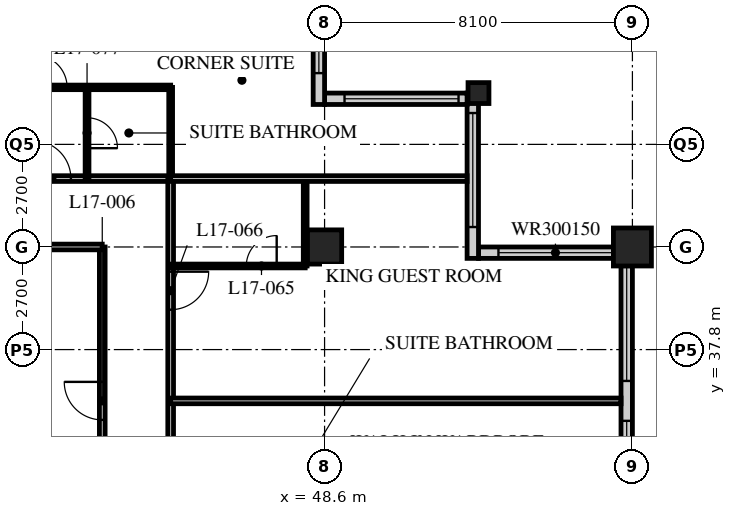
"""IFC4 building model, lengths in metres.
Left out: names, types, materials, properties, quantities, classifications, styles, units other than length and angle.
Written with IfcOpenShell. Run it as: python <this file> out.ifc"""

import sys

from ifc_helpers import new_model, si_unit, direction, frame, frame_2d, origin, origin_2d, place, context, subcontext, project, spatial, rectangle, hollow_rectangle, extrude, element, fill, save


model = new_model("IFC4")
c1 = context("Model", 3, precision=1e-05, world=origin(), true_north=direction((0.0, 1.0)))
c2 = subcontext(c1, "Body", "Model", "MODEL_VIEW")
j1 = project(units=[si_unit("LENGTHUNIT", "METRE"), si_unit("PLANEANGLEUNIT", "RADIAN")], contexts=[c1])
p1 = place(None, origin())
s1 = spatial("IfcSite", under=j1, at=p1, CompositionType="ELEMENT")
p2 = place(p1, origin())
s2 = spatial("IfcBuilding", under=s1, at=p2, CompositionType="ELEMENT")
p3 = place(p2, frame((0.0, 0.0, 70.4)))
s3 = spatial("IfcBuildingStorey", under=s2, at=p3, CompositionType="ELEMENT", Elevation=70.4)
p4 = place(p3, frame((48.6, 40.5, 0.0), z_axis=(0.0, 0.0, 1.0), x_axis=(1.0, 0.0, 0.0)))
e1 = element("IfcColumn", 1, at=p4, inside=s3, PredefinedType="COLUMN", context=c2, shape_type="SweptSolid", body=[
    extrude(hollow_rectangle(XDim=0.9, YDim=0.9, WallThickness=0.09, at=origin_2d()), origin(), (0.0, 0.0, 1.0), 3.4),
])
p5 = place(p3, frame((52.65, 44.55, 0.0), z_axis=(0.0, 0.0, 1.0), x_axis=(1.0, 0.0, 0.0)))
e2 = element("IfcColumn", 2, at=p5, inside=s3, PredefinedType="COLUMN", context=c2, shape_type="SweptSolid", body=[
    extrude(hollow_rectangle(XDim=0.55, YDim=0.55, WallThickness=0.05, at=origin_2d()), origin(), (0.0, 0.0, 1.0), 3.4),
])
p6 = place(p3, frame((56.7, 40.5, 0.0), z_axis=(0.0, 0.0, 1.0), x_axis=(1.0, 0.0, 0.0)))
e3 = element("IfcColumn", 3, at=p6, inside=s3, PredefinedType="COLUMN", context=c2, shape_type="SweptSolid", body=[
    extrude(hollow_rectangle(XDim=1.0, YDim=1.0, WallThickness=0.1, at=origin_2d()), origin(), (0.0, 0.0, 1.0), 3.4),
])
p7 = place(p3, frame((56.55, 8.4, 0.0), z_axis=(0.0, 0.0, 1.0), x_axis=(0.0, 1.0, 0.0)))
e4 = element("IfcWall", 4, at=p7, inside=s3, PredefinedType="SOLIDWALL", context=c2, shape_type="SweptSolid", body=[
    extrude(rectangle(XDim=32.1, YDim=0.3, at=frame_2d((16.05, 0.0))), origin(), (0.0, 0.0, 1.0), 3.19),
])
p8 = place(p7, frame((0.225, 0.0, 0.9)))
e5 = element("IfcOpeningElement", 5, at=p8, cuts=e4, PredefinedType="OPENING", context=c2, shape_type="SweptSolid", body=[
    extrude(rectangle(XDim=3.0, YDim=2.0, at=frame_2d((1.5, 1.0))), frame((0.0, 0.16, 0.0), z_axis=(0.0, -1.0, 0.0), x_axis=(1.0, 0.0, 0.0)), (0.0, 0.0, 1.0), 0.32),
])
p9 = place(p7, frame((4.275, 0.0, 0.9)))
e6 = element("IfcOpeningElement", 6, at=p9, cuts=e4, PredefinedType="OPENING", context=c2, shape_type="SweptSolid", body=[
    extrude(rectangle(XDim=3.0, YDim=2.0, at=frame_2d((1.5, 1.0))), frame((0.0, 0.16, 0.0), z_axis=(0.0, -1.0, 0.0), x_axis=(1.0, 0.0, 0.0)), (0.0, 0.0, 1.0), 0.32),
])
p10 = place(p7, frame((8.325, 0.0, 0.9)))
e7 = element("IfcOpeningElement", 7, at=p10, cuts=e4, PredefinedType="OPENING", context=c2, shape_type="SweptSolid", body=[
    extrude(rectangle(XDim=3.0, YDim=2.0, at=frame_2d((1.5, 1.0))), frame((0.0, 0.16, 0.0), z_axis=(0.0, -1.0, 0.0), x_axis=(1.0, 0.0, 0.0)), (0.0, 0.0, 1.0), 0.32),
])
p11 = place(p7, frame((12.375, 0.0, 0.9)))
e8 = element("IfcOpeningElement", 8, at=p11, cuts=e4, PredefinedType="OPENING", context=c2, shape_type="SweptSolid", body=[
    extrude(rectangle(XDim=3.0, YDim=2.0, at=frame_2d((1.5, 1.0))), frame((0.0, 0.16, 0.0), z_axis=(0.0, -1.0, 0.0), x_axis=(1.0, 0.0, 0.0)), (0.0, 0.0, 1.0), 0.32),
])
p12 = place(p7, frame((16.425, 0.0, 0.9)))
e9 = element("IfcOpeningElement", 9, at=p12, cuts=e4, PredefinedType="OPENING", context=c2, shape_type="SweptSolid", body=[
    extrude(rectangle(XDim=3.0, YDim=2.0, at=frame_2d((1.5, 1.0))), frame((0.0, 0.16, 0.0), z_axis=(0.0, -1.0, 0.0), x_axis=(1.0, 0.0, 0.0)), (0.0, 0.0, 1.0), 0.32),
])
p13 = place(p7, frame((20.475, 0.0, 0.9)))
e10 = element("IfcOpeningElement", 10, at=p13, cuts=e4, PredefinedType="OPENING", context=c2, shape_type="SweptSolid", body=[
    extrude(rectangle(XDim=3.0, YDim=2.0, at=frame_2d((1.5, 1.0))), frame((0.0, 0.16, 0.0), z_axis=(0.0, -1.0, 0.0), x_axis=(1.0, 0.0, 0.0)), (0.0, 0.0, 1.0), 0.32),
])
p14 = place(p7, frame((24.525, 0.0, 0.9)))
e11 = element("IfcOpeningElement", 11, at=p14, cuts=e4, PredefinedType="OPENING", context=c2, shape_type="SweptSolid", body=[
    extrude(rectangle(XDim=3.0, YDim=2.0, at=frame_2d((1.5, 1.0))), frame((0.0, 0.16, 0.0), z_axis=(0.0, -1.0, 0.0), x_axis=(1.0, 0.0, 0.0)), (0.0, 0.0, 1.0), 0.32),
])
p15 = place(p7, frame((28.575, 0.0, 0.9)))
e12 = element("IfcOpeningElement", 12, at=p15, cuts=e4, PredefinedType="OPENING", context=c2, shape_type="SweptSolid", body=[
    extrude(rectangle(XDim=3.0, YDim=2.0, at=frame_2d((1.5, 1.0))), frame((0.0, 0.16, 0.0), z_axis=(0.0, -1.0, 0.0), x_axis=(1.0, 0.0, 0.0)), (0.0, 0.0, 1.0), 0.32),
])
p16 = place(p3, frame((56.4, 40.35, 0.0), z_axis=(0.0, 0.0, 1.0), x_axis=(-1.0, 0.0, 0.0)))
e13 = element("IfcWall", 13, at=p16, inside=s3, PredefinedType="SOLIDWALL", context=c2, shape_type="SweptSolid", body=[
    extrude(rectangle(XDim=3.75, YDim=0.3, at=frame_2d((1.875, 0.0))), origin(), (0.0, 0.0, 1.0), 3.19),
])
p17 = place(p16, frame((0.225, 0.0, 0.9)))
e14 = element("IfcOpeningElement", 14, at=p17, cuts=e13, PredefinedType="OPENING", context=c2, shape_type="SweptSolid", body=[
    extrude(rectangle(XDim=3.0, YDim=1.5, at=frame_2d((1.5, 0.75))), frame((0.0, 0.16, 0.0), z_axis=(0.0, -1.0, 0.0), x_axis=(1.0, 0.0, 0.0)), (0.0, 0.0, 1.0), 0.32),
])
p18 = place(p3, frame((52.5, 40.2, 0.0), z_axis=(0.0, 0.0, 1.0), x_axis=(0.0, 1.0, 0.0)))
e15 = element("IfcWall", 15, at=p18, inside=s3, PredefinedType="SOLIDWALL", context=c2, shape_type="SweptSolid", body=[
    extrude(rectangle(XDim=4.35, YDim=0.3, at=frame_2d((2.175, 0.0))), origin(), (0.0, 0.0, 1.0), 3.19),
])
p19 = place(p18, frame((0.825, 0.0, 0.9)))
e16 = element("IfcOpeningElement", 16, at=p19, cuts=e15, PredefinedType="OPENING", context=c2, shape_type="SweptSolid", body=[
    extrude(rectangle(XDim=3.0, YDim=1.5, at=frame_2d((1.5, 0.75))), frame((0.0, 0.16, 0.0), z_axis=(0.0, -1.0, 0.0), x_axis=(1.0, 0.0, 0.0)), (0.0, 0.0, 1.0), 0.32),
])
p20 = place(p3, frame((52.35, 44.4, 0.0), z_axis=(0.0, 0.0, 1.0), x_axis=(-1.0, 0.0, 0.0)))
e17 = element("IfcWall", 17, at=p20, inside=s3, PredefinedType="SOLIDWALL", context=c2, shape_type="SweptSolid", body=[
    extrude(rectangle(XDim=3.75, YDim=0.3, at=frame_2d((1.875, 0.0))), origin(), (0.0, 0.0, 1.0), 3.19),
])
p21 = place(p20, frame((0.225, 0.0, 0.9)))
e18 = element("IfcOpeningElement", 18, at=p21, cuts=e17, PredefinedType="OPENING", context=c2, shape_type="SweptSolid", body=[
    extrude(rectangle(XDim=3.0, YDim=1.5, at=frame_2d((1.5, 0.75))), frame((0.0, 0.16, 0.0), z_axis=(0.0, -1.0, 0.0), x_axis=(1.0, 0.0, 0.0)), (0.0, 0.0, 1.0), 0.32),
])
p22 = place(p3, frame((48.45, 44.25, 0.0), z_axis=(0.0, 0.0, 1.0), x_axis=(0.0, 1.0, 0.0)))
e19 = element("IfcWall", 19, at=p22, inside=s3, PredefinedType="SOLIDWALL", context=c2, shape_type="SweptSolid", body=[
    extrude(rectangle(XDim=4.35, YDim=0.3, at=frame_2d((2.175, 0.0))), origin(), (0.0, 0.0, 1.0), 3.19),
])
p23 = place(p22, frame((0.825, 0.0, 0.9)))
e20 = element("IfcOpeningElement", 20, at=p23, cuts=e19, PredefinedType="OPENING", context=c2, shape_type="SweptSolid", body=[
    extrude(rectangle(XDim=3.0, YDim=1.5, at=frame_2d((1.5, 0.75))), frame((0.0, 0.16, 0.0), z_axis=(0.0, -1.0, 0.0), x_axis=(1.0, 0.0, 0.0)), (0.0, 0.0, 1.0), 0.32),
])
p24 = place(p3, frame((8.1, 42.3, 0.0), z_axis=(0.0, 0.0, 1.0), x_axis=(1.0, 0.0, 0.0)))
e21 = element("IfcWall", 21, at=p24, inside=s3, PredefinedType="PARTITIONING", context=c2, shape_type="SweptSolid", body=[
    extrude(rectangle(XDim=36.45, YDim=0.15, at=frame_2d((18.225, 0.0))), origin(), (0.0, 0.0, 1.0), 3.19),
])
p25 = place(p24, frame((9.5, 0.0, 0.0)))
e22 = element("IfcOpeningElement", 22, at=p25, cuts=e21, PredefinedType="OPENING", context=c2, shape_type="SweptSolid", body=[
    extrude(rectangle(XDim=1.0, YDim=2.1, at=frame_2d((0.5, 1.05))), frame((0.0, 0.085, 0.0), z_axis=(0.0, -1.0, 0.0), x_axis=(1.0, 0.0, 0.0)), (0.0, 0.0, 1.0), 0.17),
])
p26 = place(p24, frame((14.6, 0.0, 0.0)))
e23 = element("IfcOpeningElement", 23, at=p26, cuts=e21, PredefinedType="OPENING", context=c2, shape_type="SweptSolid", body=[
    extrude(rectangle(XDim=1.0, YDim=2.1, at=frame_2d((0.5, 1.05))), frame((0.0, 0.085, 0.0), z_axis=(0.0, -1.0, 0.0), x_axis=(1.0, 0.0, 0.0)), (0.0, 0.0, 1.0), 0.17),
])
p27 = place(p24, frame((18.65, 0.0, 0.0)))
e24 = element("IfcOpeningElement", 24, at=p27, cuts=e21, PredefinedType="OPENING", context=c2, shape_type="SweptSolid", body=[
    extrude(rectangle(XDim=1.0, YDim=2.1, at=frame_2d((0.5, 1.05))), frame((0.0, 0.085, 0.0), z_axis=(0.0, -1.0, 0.0), x_axis=(1.0, 0.0, 0.0)), (0.0, 0.0, 1.0), 0.17),
])
p28 = place(p24, frame((25.7, 0.0, 0.0)))
e25 = element("IfcOpeningElement", 25, at=p28, cuts=e21, PredefinedType="OPENING", context=c2, shape_type="SweptSolid", body=[
    extrude(rectangle(XDim=1.0, YDim=2.1, at=frame_2d((0.5, 1.05))), frame((0.0, 0.085, 0.0), z_axis=(0.0, -1.0, 0.0), x_axis=(1.0, 0.0, 0.0)), (0.0, 0.0, 1.0), 0.17),
])
p29 = place(p24, frame((30.8, 0.0, 0.0)))
e26 = element("IfcOpeningElement", 26, at=p29, cuts=e21, PredefinedType="OPENING", context=c2, shape_type="SweptSolid", body=[
    extrude(rectangle(XDim=1.0, YDim=2.1, at=frame_2d((0.5, 1.05))), frame((0.0, 0.085, 0.0), z_axis=(0.0, -1.0, 0.0), x_axis=(1.0, 0.0, 0.0)), (0.0, 0.0, 1.0), 0.17),
])
p30 = place(p24, frame((32.825, 0.0, 0.0)))
e27 = element("IfcOpeningElement", 27, at=p30, cuts=e21, PredefinedType="OPENING", context=c2, shape_type="SweptSolid", body=[
    extrude(rectangle(XDim=1.0, YDim=2.1, at=frame_2d((0.5, 1.05))), frame((0.0, 0.085, 0.0), z_axis=(0.0, -1.0, 0.0), x_axis=(1.0, 0.0, 0.0)), (0.0, 0.0, 1.0), 0.17),
])
p31 = place(p24, frame((2.625, 0.0, 0.0)))
e28 = element("IfcOpeningElement", 28, at=p31, cuts=e21, PredefinedType="OPENING", context=c2, shape_type="SweptSolid", body=[
    extrude(rectangle(XDim=1.0, YDim=2.1, at=frame_2d((0.5, 1.05))), frame((0.0, 0.085, 0.0), z_axis=(0.0, -1.0, 0.0), x_axis=(1.0, 0.0, 0.0)), (0.0, 0.0, 1.0), 0.17),
])
p32 = place(p3, frame((44.55, 12.15, 0.0), z_axis=(0.0, 0.0, 1.0), x_axis=(0.0, 1.0, 0.0)))
e29 = element("IfcWall", 29, at=p32, inside=s3, PredefinedType="PARTITIONING", context=c2, shape_type="SweptSolid", body=[
    extrude(rectangle(XDim=30.15, YDim=0.15, at=frame_2d((15.075, 0.0))), origin(), (0.0, 0.0, 1.0), 3.19),
])
p33 = place(p32, frame((2.45, 0.0, 0.0)))
e30 = element("IfcOpeningElement", 30, at=p33, cuts=e29, PredefinedType="OPENING", context=c2, shape_type="SweptSolid", body=[
    extrude(rectangle(XDim=1.0, YDim=2.1, at=frame_2d((0.5, 1.05))), frame((0.0, 0.085, 0.0), z_axis=(0.0, -1.0, 0.0), x_axis=(1.0, 0.0, 0.0)), (0.0, 0.0, 1.0), 0.17),
])
p34 = place(p32, frame((4.35, 0.0, 0.0)))
e31 = element("IfcOpeningElement", 31, at=p34, cuts=e29, PredefinedType="OPENING", context=c2, shape_type="SweptSolid", body=[
    extrude(rectangle(XDim=1.0, YDim=2.1, at=frame_2d((0.5, 1.05))), frame((0.0, 0.085, 0.0), z_axis=(0.0, -1.0, 0.0), x_axis=(1.0, 0.0, 0.0)), (0.0, 0.0, 1.0), 0.17),
])
p35 = place(p32, frame((8.4, 0.0, 0.0)))
e32 = element("IfcOpeningElement", 32, at=p35, cuts=e29, PredefinedType="OPENING", context=c2, shape_type="SweptSolid", body=[
    extrude(rectangle(XDim=1.0, YDim=2.1, at=frame_2d((0.5, 1.05))), frame((0.0, 0.085, 0.0), z_axis=(0.0, -1.0, 0.0), x_axis=(1.0, 0.0, 0.0)), (0.0, 0.0, 1.0), 0.17),
])
p36 = place(p32, frame((14.6, 0.0, 0.0)))
e33 = element("IfcOpeningElement", 33, at=p36, cuts=e29, PredefinedType="OPENING", context=c2, shape_type="SweptSolid", body=[
    extrude(rectangle(XDim=1.0, YDim=2.1, at=frame_2d((0.5, 1.05))), frame((0.0, 0.085, 0.0), z_axis=(0.0, -1.0, 0.0), x_axis=(1.0, 0.0, 0.0)), (0.0, 0.0, 1.0), 0.17),
])
p37 = place(p32, frame((21.65, 0.0, 0.0)))
e34 = element("IfcOpeningElement", 34, at=p37, cuts=e29, PredefinedType="OPENING", context=c2, shape_type="SweptSolid", body=[
    extrude(rectangle(XDim=1.0, YDim=2.1, at=frame_2d((0.5, 1.05))), frame((0.0, 0.085, 0.0), z_axis=(0.0, -1.0, 0.0), x_axis=(1.0, 0.0, 0.0)), (0.0, 0.0, 1.0), 0.17),
])
p38 = place(p32, frame((26.7, 0.0, 0.0)))
e35 = element("IfcOpeningElement", 35, at=p38, cuts=e29, PredefinedType="OPENING", context=c2, shape_type="SweptSolid", body=[
    extrude(rectangle(XDim=1.0, YDim=2.1, at=frame_2d((0.5, 1.05))), frame((0.0, 0.085, 0.0), z_axis=(0.0, -1.0, 0.0), x_axis=(1.0, 0.0, 0.0)), (0.0, 0.0, 1.0), 0.17),
])
p39 = place(p3, frame((42.75, 13.95, 0.0), z_axis=(0.0, 0.0, 1.0), x_axis=(0.0, 1.0, 0.0)))
e36 = element("IfcWall", 36, at=p39, inside=s3, PredefinedType="PARTITIONING", context=c2, shape_type="SweptSolid", body=[
    extrude(rectangle(XDim=26.55, YDim=0.15, at=frame_2d((13.275, 0.0))), origin(), (0.0, 0.0, 1.0), 3.19),
])
p40 = place(p39, frame((13.9, 0.0, 0.0)))
e37 = element("IfcOpeningElement", 37, at=p40, cuts=e36, PredefinedType="OPENING", context=c2, shape_type="SweptSolid", body=[
    extrude(rectangle(XDim=1.0, YDim=2.1, at=frame_2d((0.5, 1.05))), frame((0.0, 0.085, 0.0), z_axis=(0.0, -1.0, 0.0), x_axis=(1.0, 0.0, 0.0)), (0.0, 0.0, 1.0), 0.17),
])
p41 = place(p39, frame((22.0, 0.0, 0.0)))
e38 = element("IfcOpeningElement", 38, at=p41, cuts=e36, PredefinedType="OPENING", context=c2, shape_type="SweptSolid", body=[
    extrude(rectangle(XDim=1.0, YDim=2.1, at=frame_2d((0.5, 1.05))), frame((0.0, 0.085, 0.0), z_axis=(0.0, -1.0, 0.0), x_axis=(1.0, 0.0, 0.0)), (0.0, 0.0, 1.0), 0.17),
])
p42 = place(p3, frame((42.75, 40.5, 0.0), z_axis=(0.0, 0.0, 1.0), x_axis=(-1.0, 0.0, 0.0)))
e39 = element("IfcWall", 39, at=p42, inside=s3, PredefinedType="PARTITIONING", context=c2, shape_type="SweptSolid", body=[
    extrude(rectangle(XDim=2.05, YDim=0.15, at=frame_2d((1.025, 0.0))), origin(), (0.0, 0.0, 1.0), 2.578),
])
p43 = place(p3, frame((44.55, 36.45, 0.0), z_axis=(0.0, 0.0, 1.0), x_axis=(1.0, 0.0, 0.0)))
e40 = element("IfcWall", 40, at=p43, inside=s3, PredefinedType="PARTITIONING", context=c2, shape_type="SweptSolid", body=[
    extrude(rectangle(XDim=11.85, YDim=0.15, at=frame_2d((5.925, 0.0))), origin(), (0.0, 0.0, 1.0), 3.19),
])
p44 = place(p3, frame((48.09, 40.0, 0.0), z_axis=(0.0, 0.0, 1.0), x_axis=(0.0, 1.0, 0.0)))
e41 = element("IfcWall", 41, at=p44, inside=s3, PredefinedType="PARTITIONING", context=c2, shape_type="SweptSolid", body=[
    extrude(rectangle(XDim=2.3, YDim=0.1, at=frame_2d((1.15, 0.0))), origin(), (0.0, 0.0, 1.0), 3.19),
])
p45 = place(p3, frame((44.55, 40.0, 0.0), z_axis=(0.0, 0.0, 1.0), x_axis=(1.0, 0.0, 0.0)))
e42 = element("IfcWall", 42, at=p45, inside=s3, PredefinedType="PARTITIONING", context=c2, shape_type="SweptSolid", body=[
    extrude(rectangle(XDim=3.54, YDim=0.1, at=frame_2d((1.77, 0.0))), origin(), (0.0, 0.0, 1.0), 3.19),
])
p46 = place(p45, frame((1.99, 0.0, 0.0)))
e43 = element("IfcOpeningElement", 43, at=p46, cuts=e42, PredefinedType="OPENING", context=c2, shape_type="SweptSolid", body=[
    extrude(rectangle(XDim=0.8, YDim=2.1, at=frame_2d((0.4, 1.05))), frame((0.0, 0.06, 0.0), z_axis=(0.0, -1.0, 0.0), x_axis=(1.0, 0.0, 0.0)), (0.0, 0.0, 1.0), 0.12),
])
p47 = place(p3, frame((40.5, 44.7, 0.0), z_axis=(0.0, 0.0, 1.0), x_axis=(1.0, 0.0, 0.0)))
e44 = element("IfcWall", 44, at=p47, inside=s3, PredefinedType="PARTITIONING", context=c2, shape_type="SweptSolid", body=[
    extrude(rectangle(XDim=4.05, YDim=0.12, at=frame_2d((2.025, 0.0))), origin(), (0.0, 0.0, 1.0), 3.19),
])
p48 = place(p47, frame((0.475, 0.0, 0.0)))
e45 = element("IfcOpeningElement", 45, at=p48, cuts=e44, PredefinedType="OPENING", context=c2, shape_type="SweptSolid", body=[
    extrude(rectangle(XDim=0.85, YDim=2.1, at=frame_2d((0.425, 1.05))), frame((0.0, 0.07, 0.0), z_axis=(0.0, -1.0, 0.0), x_axis=(1.0, 0.0, 0.0)), (0.0, 0.0, 1.0), 0.14),
])
p49 = place(p3, frame((42.35, 42.3, 0.0), z_axis=(0.0, 0.0, 1.0), x_axis=(0.0, 1.0, 0.0)))
e46 = element("IfcWall", 46, at=p49, inside=s3, PredefinedType="PARTITIONING", context=c2, shape_type="SweptSolid", body=[
    extrude(rectangle(XDim=2.4, YDim=0.1, at=frame_2d((1.2, 0.0))), origin(), (0.0, 0.0, 1.0), 3.19),
])
p50 = place(p49, frame((0.8, 0.0, 0.0)))
e47 = element("IfcOpeningElement", 47, at=p50, cuts=e46, PredefinedType="OPENING", context=c2, shape_type="SweptSolid", body=[
    extrude(rectangle(XDim=0.8, YDim=2.1, at=frame_2d((0.4, 1.05))), frame((0.0, 0.06, 0.0), z_axis=(0.0, -1.0, 0.0), x_axis=(1.0, 0.0, 0.0)), (0.0, 0.0, 1.0), 0.12),
])
p51 = place(p3, frame((44.55, 42.3, 0.0), z_axis=(0.0, 0.0, 1.0), x_axis=(0.0, 1.0, 0.0)))
e48 = element("IfcWall", 48, at=p51, inside=s3, PredefinedType="PARTITIONING", context=c2, shape_type="SweptSolid", body=[
    extrude(rectangle(XDim=2.4, YDim=0.1, at=frame_2d((1.2, 0.0))), origin(), (0.0, 0.0, 1.0), 3.19),
])
p52 = place(p3, frame((44.55, 42.3, 0.0), z_axis=(0.0, 0.0, 1.0), x_axis=(1.0, 0.0, 0.0)))
e49 = element("IfcWall", 49, at=p52, inside=s3, PredefinedType="PARTITIONING", context=c2, shape_type="SweptSolid", body=[
    extrude(rectangle(XDim=7.8, YDim=0.15, at=frame_2d((3.9, 0.0))), origin(), (0.0, 0.0, 1.0), 3.19),
])
p53 = place(p14, origin())
e50 = element("IfcWindow", 50, at=p53, inside=s3, PartitioningType="SINGLE_PANEL", PredefinedType="WINDOW", context=c2, shape_type="SweptSolid", body=[
    extrude(rectangle(XDim=3.0, YDim=2.0, at=frame_2d((1.5, 1.0))), frame((0.0, 0.03, 0.0), z_axis=(0.0, -1.0, 0.0), x_axis=(1.0, 0.0, 0.0)), (0.0, 0.0, 1.0), 0.06),
])
fill(e11, e50)
p54 = place(p15, origin())
e51 = element("IfcWindow", 51, at=p54, inside=s3, PartitioningType="SINGLE_PANEL", PredefinedType="WINDOW", context=c2, shape_type="SweptSolid", body=[
    extrude(rectangle(XDim=3.0, YDim=2.0, at=frame_2d((1.5, 1.0))), frame((0.0, 0.03, 0.0), z_axis=(0.0, -1.0, 0.0), x_axis=(1.0, 0.0, 0.0)), (0.0, 0.0, 1.0), 0.06),
])
fill(e12, e51)
p55 = place(p17, origin())
e52 = element("IfcWindow", 52, at=p55, inside=s3, PartitioningType="SINGLE_PANEL", PredefinedType="WINDOW", context=c2, shape_type="SweptSolid", body=[
    extrude(rectangle(XDim=3.0, YDim=1.5, at=frame_2d((1.5, 0.75))), frame((0.0, 0.03, 0.0), z_axis=(0.0, -1.0, 0.0), x_axis=(1.0, 0.0, 0.0)), (0.0, 0.0, 1.0), 0.06),
])
fill(e14, e52)
p56 = place(p19, origin())
e53 = element("IfcWindow", 53, at=p56, inside=s3, PartitioningType="SINGLE_PANEL", PredefinedType="WINDOW", context=c2, shape_type="SweptSolid", body=[
    extrude(rectangle(XDim=3.0, YDim=1.5, at=frame_2d((1.5, 0.75))), frame((0.0, 0.03, 0.0), z_axis=(0.0, -1.0, 0.0), x_axis=(1.0, 0.0, 0.0)), (0.0, 0.0, 1.0), 0.06),
])
fill(e16, e53)
p57 = place(p21, origin())
e54 = element("IfcWindow", 54, at=p57, inside=s3, PartitioningType="SINGLE_PANEL", PredefinedType="WINDOW", context=c2, shape_type="SweptSolid", body=[
    extrude(rectangle(XDim=3.0, YDim=1.5, at=frame_2d((1.5, 0.75))), frame((0.0, 0.03, 0.0), z_axis=(0.0, -1.0, 0.0), x_axis=(1.0, 0.0, 0.0)), (0.0, 0.0, 1.0), 0.06),
])
fill(e18, e54)
p58 = place(p23, origin())
e55 = element("IfcWindow", 55, at=p58, inside=s3, PartitioningType="SINGLE_PANEL", PredefinedType="WINDOW", context=c2, shape_type="SweptSolid", body=[
    extrude(rectangle(XDim=3.0, YDim=1.5, at=frame_2d((1.5, 0.75))), frame((0.0, 0.03, 0.0), z_axis=(0.0, -1.0, 0.0), x_axis=(1.0, 0.0, 0.0)), (0.0, 0.0, 1.0), 0.06),
])
fill(e20, e55)
p59 = place(p41, origin())
e56 = element("IfcDoor", 56, at=p59, inside=s3, OperationType="SINGLE_SWING_RIGHT", PredefinedType="DOOR", context=c2, shape_type="SweptSolid", body=[
    extrude(rectangle(XDim=1.0, YDim=2.1, at=frame_2d((0.5, 1.05))), frame((0.0, 0.025, 0.0), z_axis=(0.0, -1.0, 0.0), x_axis=(1.0, 0.0, 0.0)), (0.0, 0.0, 1.0), 0.05),
])
fill(e38, e56)
p60 = place(p46, origin())
e57 = element("IfcDoor", 57, at=p60, inside=s3, OperationType="SINGLE_SWING_RIGHT", PredefinedType="DOOR", context=c2, shape_type="SweptSolid", body=[
    extrude(rectangle(XDim=0.8, YDim=2.1, at=frame_2d((0.4, 1.05))), frame((0.0, 0.025, 0.0), z_axis=(0.0, -1.0, 0.0), x_axis=(1.0, 0.0, 0.0)), (0.0, 0.0, 1.0), 0.05),
])
fill(e43, e57)
p61 = place(p38, origin())
e58 = element("IfcDoor", 58, at=p61, inside=s3, OperationType="SINGLE_SWING_LEFT", PredefinedType="DOOR", context=c2, shape_type="SweptSolid", body=[
    extrude(rectangle(XDim=1.0, YDim=2.1, at=frame_2d((0.5, 1.05))), frame((0.0, 0.025, 0.0), z_axis=(0.0, -1.0, 0.0), x_axis=(1.0, 0.0, 0.0)), (0.0, 0.0, 1.0), 0.05),
])
fill(e35, e58)
p62 = place(p50, origin())
e59 = element("IfcDoor", 59, at=p62, inside=s3, OperationType="SINGLE_SWING_RIGHT", PredefinedType="DOOR", context=c2, shape_type="SweptSolid", body=[
    extrude(rectangle(XDim=0.8, YDim=2.1, at=frame_2d((0.4, 1.05))), frame((0.0, 0.025, 0.0), z_axis=(0.0, -1.0, 0.0), x_axis=(1.0, 0.0, 0.0)), (0.0, 0.0, 1.0), 0.05),
])
fill(e47, e59)
p63 = place(p30, origin())
e60 = element("IfcDoor", 60, at=p63, inside=s3, OperationType="SINGLE_SWING_LEFT", PredefinedType="DOOR", context=c2, shape_type="SweptSolid", body=[
    extrude(rectangle(XDim=1.0, YDim=2.1, at=frame_2d((0.5, 1.05))), frame((0.0, 0.025, 0.0), z_axis=(0.0, -1.0, 0.0), x_axis=(1.0, 0.0, 0.0)), (0.0, 0.0, 1.0), 0.05),
])
fill(e27, e60)
p64 = place(p48, origin())
e61 = element("IfcDoor", 61, at=p64, inside=s3, OperationType="SINGLE_SWING_LEFT", PredefinedType="DOOR", context=c2, shape_type="SweptSolid", body=[
    extrude(rectangle(XDim=0.85, YDim=2.1, at=frame_2d((0.425, 1.05))), frame((0.0, 0.025, 0.0), z_axis=(0.0, -1.0, 0.0), x_axis=(1.0, 0.0, 0.0)), (0.0, 0.0, 1.0), 0.05),
])
fill(e45, e61)
save(model, sys.argv[1])
